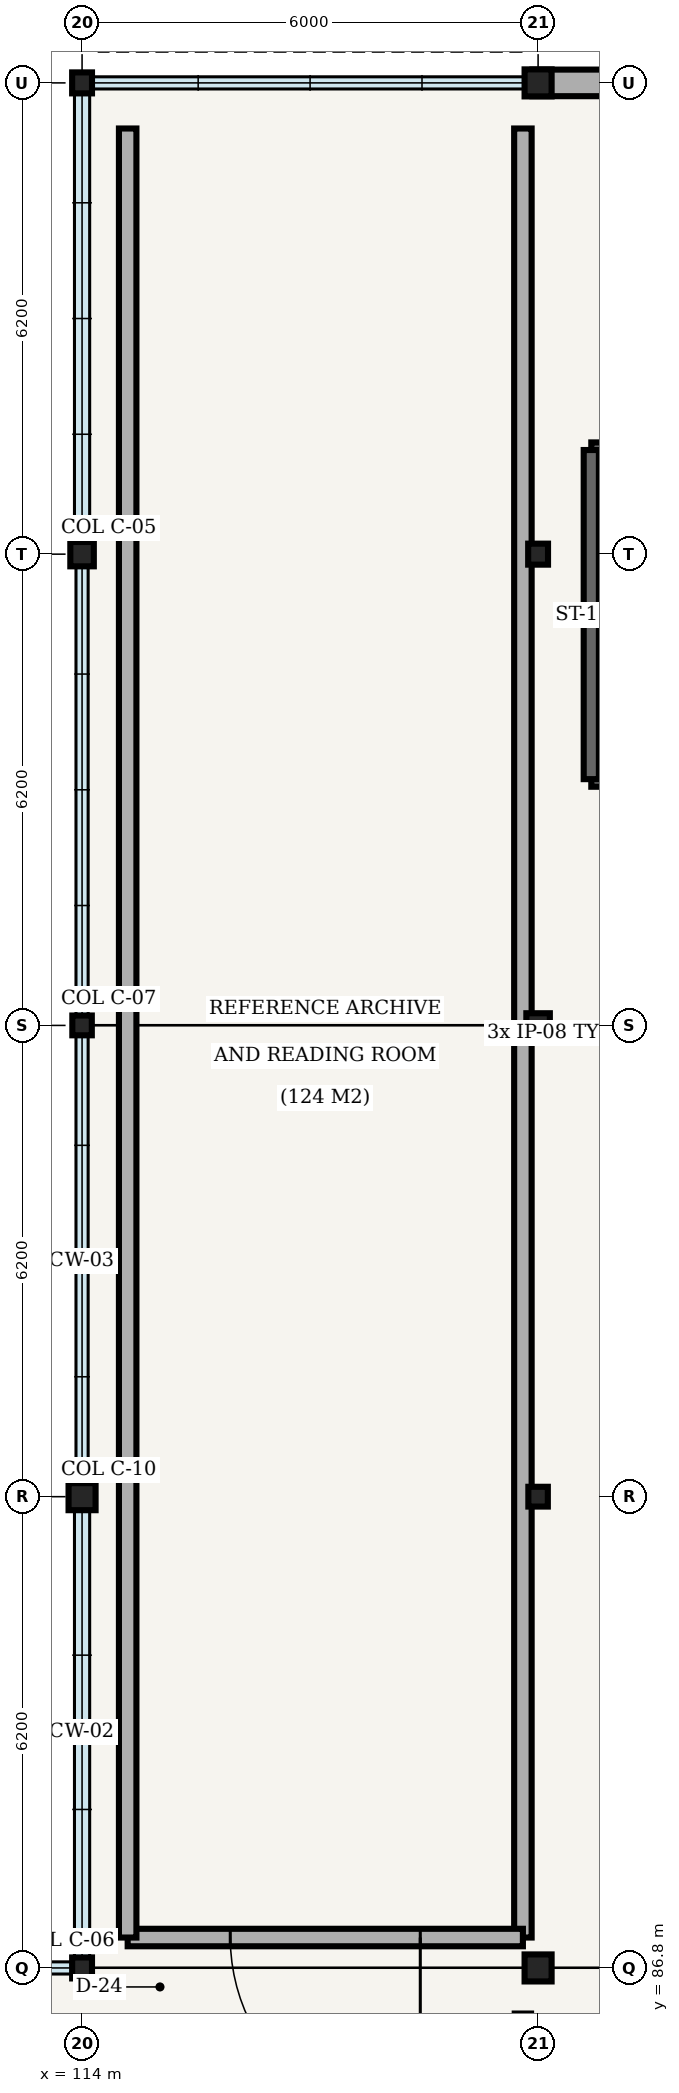
"""IFC4 building model, lengths in metres.
Left out: names, types, materials, properties, quantities, classifications, styles, units other than length and angle.
Written with IfcOpenShell. Run it as: python <this file> out.ifc"""

import sys

from ifc_helpers import new_model, si_unit, direction, frame, frame_2d, origin, origin_2d, place, context, subcontext, project, spatial, rectangle, hollow_circle, i_section, extrude, element, fill, save


model = new_model("IFC4")
c1 = context("Model", 3, precision=1e-05, world=origin(), true_north=direction((0.0, 1.0)))
c2 = subcontext(c1, "Body", "Model", "MODEL_VIEW")
j1 = project(units=[si_unit("LENGTHUNIT", "METRE"), si_unit("PLANEANGLEUNIT", "RADIAN")], contexts=[c1])
p1 = place(None, origin())
s1 = spatial("IfcSite", under=j1, at=p1, CompositionType="ELEMENT")
p2 = place(p1, origin())
s2 = spatial("IfcBuilding", under=s1, at=p2, CompositionType="ELEMENT")
p3 = place(p2, frame((0.0, 0.0, 15.6)))
s3 = spatial("IfcBuildingStorey", under=s2, at=p3, CompositionType="ELEMENT", Elevation=15.6)
p4 = place(p3, frame((114.0, 86.8, 0.0), z_axis=(0.0, 0.0, 1.0), x_axis=(1.0, 0.0, 0.0)))
e1 = element("IfcColumn", 1, at=p4, inside=s3, PredefinedType="COLUMN", context=c2, shape_type="SweptSolid", body=[
    extrude(i_section(OverallWidth=0.261, OverallDepth=0.276, WebThickness=0.015, FlangeThickness=0.025, FilletRadius=0.013, at=origin_2d()), origin(), (0.0, 0.0, 1.0), 4.8),
])
p5 = place(p3, frame((114.0, 93.0, 0.0), z_axis=(0.0, 0.0, 1.0), x_axis=(1.0, 0.0, 0.0)))
e2 = element("IfcColumn", 2, at=p5, inside=s3, PredefinedType="COLUMN", context=c2, shape_type="SweptSolid", body=[
    extrude(hollow_circle(Radius=0.178, WallThickness=0.012, at=origin_2d()), origin(), (0.0, 0.0, 1.0), 4.8),
])
p6 = place(p3, frame((114.0, 99.2, 0.0), z_axis=(0.0, 0.0, 1.0), x_axis=(1.0, 0.0, 0.0)))
e3 = element("IfcColumn", 3, at=p6, inside=s3, PredefinedType="COLUMN", context=c2, shape_type="SweptSolid", body=[
    extrude(i_section(OverallWidth=0.256, OverallDepth=0.26, WebThickness=0.01, FlangeThickness=0.017, FilletRadius=0.013, at=origin_2d()), origin(), (0.0, 0.0, 1.0), 4.8),
])
p7 = place(p3, frame((114.0, 105.4, 0.0), z_axis=(0.0, 0.0, 1.0), x_axis=(1.0, 0.0, 0.0)))
e4 = element("IfcColumn", 4, at=p7, inside=s3, PredefinedType="COLUMN", context=c2, shape_type="SweptSolid", body=[
    extrude(i_section(OverallWidth=0.309, OverallDepth=0.321, WebThickness=0.014, FlangeThickness=0.022, FilletRadius=0.015, at=origin_2d()), origin(), (0.0, 0.0, 1.0), 4.8),
])
p8 = place(p3, frame((114.0, 111.6, 0.0), z_axis=(0.0, 0.0, 1.0), x_axis=(1.0, 0.0, 0.0)))
e5 = element("IfcColumn", 5, at=p8, inside=s3, PredefinedType="COLUMN", context=c2, shape_type="SweptSolid", body=[
    extrude(i_section(OverallWidth=0.261, OverallDepth=0.276, WebThickness=0.015, FlangeThickness=0.025, FilletRadius=0.013, at=origin_2d()), origin(), (0.0, 0.0, 1.0), 4.8),
])
p9 = place(p3, frame((120.0, 86.8, 0.0), z_axis=(0.0, 0.0, 1.0), x_axis=(1.0, 0.0, 0.0)))
e6 = element("IfcColumn", 6, at=p9, inside=s3, PredefinedType="COLUMN", context=c2, shape_type="SweptSolid", body=[
    extrude(hollow_circle(Radius=0.178, WallThickness=0.012, at=origin_2d()), origin(), (0.0, 0.0, 1.0), 4.8),
])
p10 = place(p3, frame((120.0, 93.0, 0.0), z_axis=(0.0, 0.0, 1.0), x_axis=(1.0, 0.0, 0.0)))
e7 = element("IfcColumn", 7, at=p10, inside=s3, PredefinedType="COLUMN", context=c2, shape_type="SweptSolid", body=[
    extrude(i_section(OverallWidth=0.256, OverallDepth=0.26, WebThickness=0.01, FlangeThickness=0.017, FilletRadius=0.013, at=origin_2d()), origin(), (0.0, 0.0, 1.0), 4.8),
])
p11 = place(p3, frame((120.0, 99.2, 0.0), z_axis=(0.0, 0.0, 1.0), x_axis=(1.0, 0.0, 0.0)))
e8 = element("IfcColumn", 8, at=p11, inside=s3, PredefinedType="COLUMN", context=c2, shape_type="SweptSolid", body=[
    extrude(i_section(OverallWidth=0.309, OverallDepth=0.321, WebThickness=0.014, FlangeThickness=0.022, FilletRadius=0.015, at=origin_2d()), origin(), (0.0, 0.0, 1.0), 4.8),
])
p12 = place(p3, frame((120.0, 105.4, 0.0), z_axis=(0.0, 0.0, 1.0), x_axis=(1.0, 0.0, 0.0)))
e9 = element("IfcColumn", 9, at=p12, inside=s3, PredefinedType="COLUMN", context=c2, shape_type="SweptSolid", body=[
    extrude(i_section(OverallWidth=0.261, OverallDepth=0.276, WebThickness=0.015, FlangeThickness=0.025, FilletRadius=0.013, at=origin_2d()), origin(), (0.0, 0.0, 1.0), 4.8),
])
p13 = place(p3, frame((120.0, 111.6, 0.0), z_axis=(0.0, 0.0, 1.0), x_axis=(1.0, 0.0, 0.0)))
e10 = element("IfcColumn", 10, at=p13, inside=s3, PredefinedType="COLUMN", context=c2, shape_type="SweptSolid", body=[
    extrude(hollow_circle(Radius=0.178, WallThickness=0.012, at=origin_2d()), origin(), (0.0, 0.0, 1.0), 4.8),
])
p14 = place(p3, frame((126.075, 111.6, 0.0), z_axis=(0.0, 0.0, 1.0), x_axis=(-1.0, 0.0, 0.0)))
e11 = element("IfcWall", 11, at=p14, inside=s3, PredefinedType="SOLIDWALL", context=c2, shape_type="SweptSolid", body=[
    extrude(rectangle(XDim=6.15, YDim=0.35, at=frame_2d((3.075, 0.0))), origin(), (0.0, 0.0, 1.0), 3.84),
])
p15 = place(p3, frame((120.7, 102.44, 0.0), z_axis=(0.0, 0.0, 1.0), x_axis=(1.0, 0.0, 0.0)))
e12 = element("IfcWall", 12, at=p15, inside=s3, PredefinedType="SHEAR", context=c2, shape_type="SweptSolid", body=[
    extrude(rectangle(XDim=3.34, YDim=0.2, at=frame_2d((1.67, 0.0))), origin(), (0.0, 0.0, 1.0), 4.55),
])
p16 = place(p15, frame((0.895, 0.0, 0.0)))
e13 = element("IfcOpeningElement", 13, at=p16, cuts=e12, PredefinedType="OPENING", context=c2, shape_type="SweptSolid", body=[
    extrude(rectangle(XDim=1.55, YDim=2.2, at=frame_2d((0.775, 1.1))), frame((0.0, 0.11, 0.0), z_axis=(0.0, -1.0, 0.0), x_axis=(1.0, 0.0, 0.0)), (0.0, 0.0, 1.0), 0.22),
])
p17 = place(p3, frame((124.04, 106.77, 0.0), z_axis=(0.0, 0.0, 1.0), x_axis=(-1.0, 0.0, 0.0)))
e14 = element("IfcWall", 14, at=p17, inside=s3, PredefinedType="SHEAR", context=c2, shape_type="SweptSolid", body=[
    extrude(rectangle(XDim=3.34, YDim=0.2, at=frame_2d((1.67, 0.0))), origin(), (0.0, 0.0, 1.0), 4.55),
])
p18 = place(p3, frame((120.7, 106.77, 0.0), z_axis=(0.0, 0.0, 1.0), x_axis=(0.0, -1.0, 0.0)))
e15 = element("IfcWall", 15, at=p18, inside=s3, PredefinedType="SHEAR", context=c2, shape_type="SweptSolid", body=[
    extrude(rectangle(XDim=4.33, YDim=0.2, at=frame_2d((2.165, 0.0))), origin(), (0.0, 0.0, 1.0), 4.55),
])
p19 = place(p3, frame((119.8, 111.0, 0.0), z_axis=(0.0, 0.0, 1.0), x_axis=(0.0, -1.0, 0.0)))
e16 = element("IfcWall", 16, at=p19, inside=s3, PredefinedType="PARTITIONING", context=c2, shape_type="SweptSolid", body=[
    extrude(rectangle(XDim=23.8, YDim=0.23, at=frame_2d((11.9, 0.0))), origin(), (0.0, 0.0, 1.0), 3.75),
])
p20 = place(p3, frame((119.8, 87.2, 0.0), z_axis=(0.0, 0.0, 1.0), x_axis=(-1.0, 0.0, 0.0)))
e17 = element("IfcWall", 17, at=p20, inside=s3, PredefinedType="PARTITIONING", context=c2, shape_type="SweptSolid", body=[
    extrude(rectangle(XDim=5.2, YDim=0.23, at=frame_2d((2.6, 0.0))), origin(), (0.0, 0.0, 1.0), 3.75),
])
p21 = place(p20, frame((1.35, 0.0, 0.0)))
e18 = element("IfcOpeningElement", 18, at=p21, cuts=e17, PredefinedType="OPENING", context=c2, shape_type="SweptSolid", body=[
    extrude(rectangle(XDim=2.5, YDim=2.25, at=frame_2d((1.25, 1.125))), frame((0.0, 0.125, 0.0), z_axis=(0.0, -1.0, 0.0), x_axis=(1.0, 0.0, 0.0)), (0.0, 0.0, 1.0), 0.25),
])
p22 = place(p3, frame((114.6, 87.2, 0.0), z_axis=(0.0, 0.0, 1.0), x_axis=(0.0, 1.0, 0.0)))
e19 = element("IfcWall", 19, at=p22, inside=s3, PredefinedType="PARTITIONING", context=c2, shape_type="SweptSolid", body=[
    extrude(rectangle(XDim=23.8, YDim=0.23, at=frame_2d((11.9, 0.0))), origin(), (0.0, 0.0, 1.0), 3.75),
])
p23 = place(p21, origin())
e20 = element("IfcDoor", 20, at=p23, inside=s3, OperationType="DOUBLE_DOOR_SINGLE_SWING", PredefinedType="DOOR", context=c2, shape_type="SweptSolid", body=[
    extrude(rectangle(XDim=2.5, YDim=2.25, at=frame_2d((1.25, 1.125))), frame((0.0, 0.025, 0.0), z_axis=(0.0, -1.0, 0.0), x_axis=(1.0, 0.0, 0.0)), (0.0, 0.0, 1.0), 0.05),
])
fill(e18, e20)
save(model, sys.argv[1])
